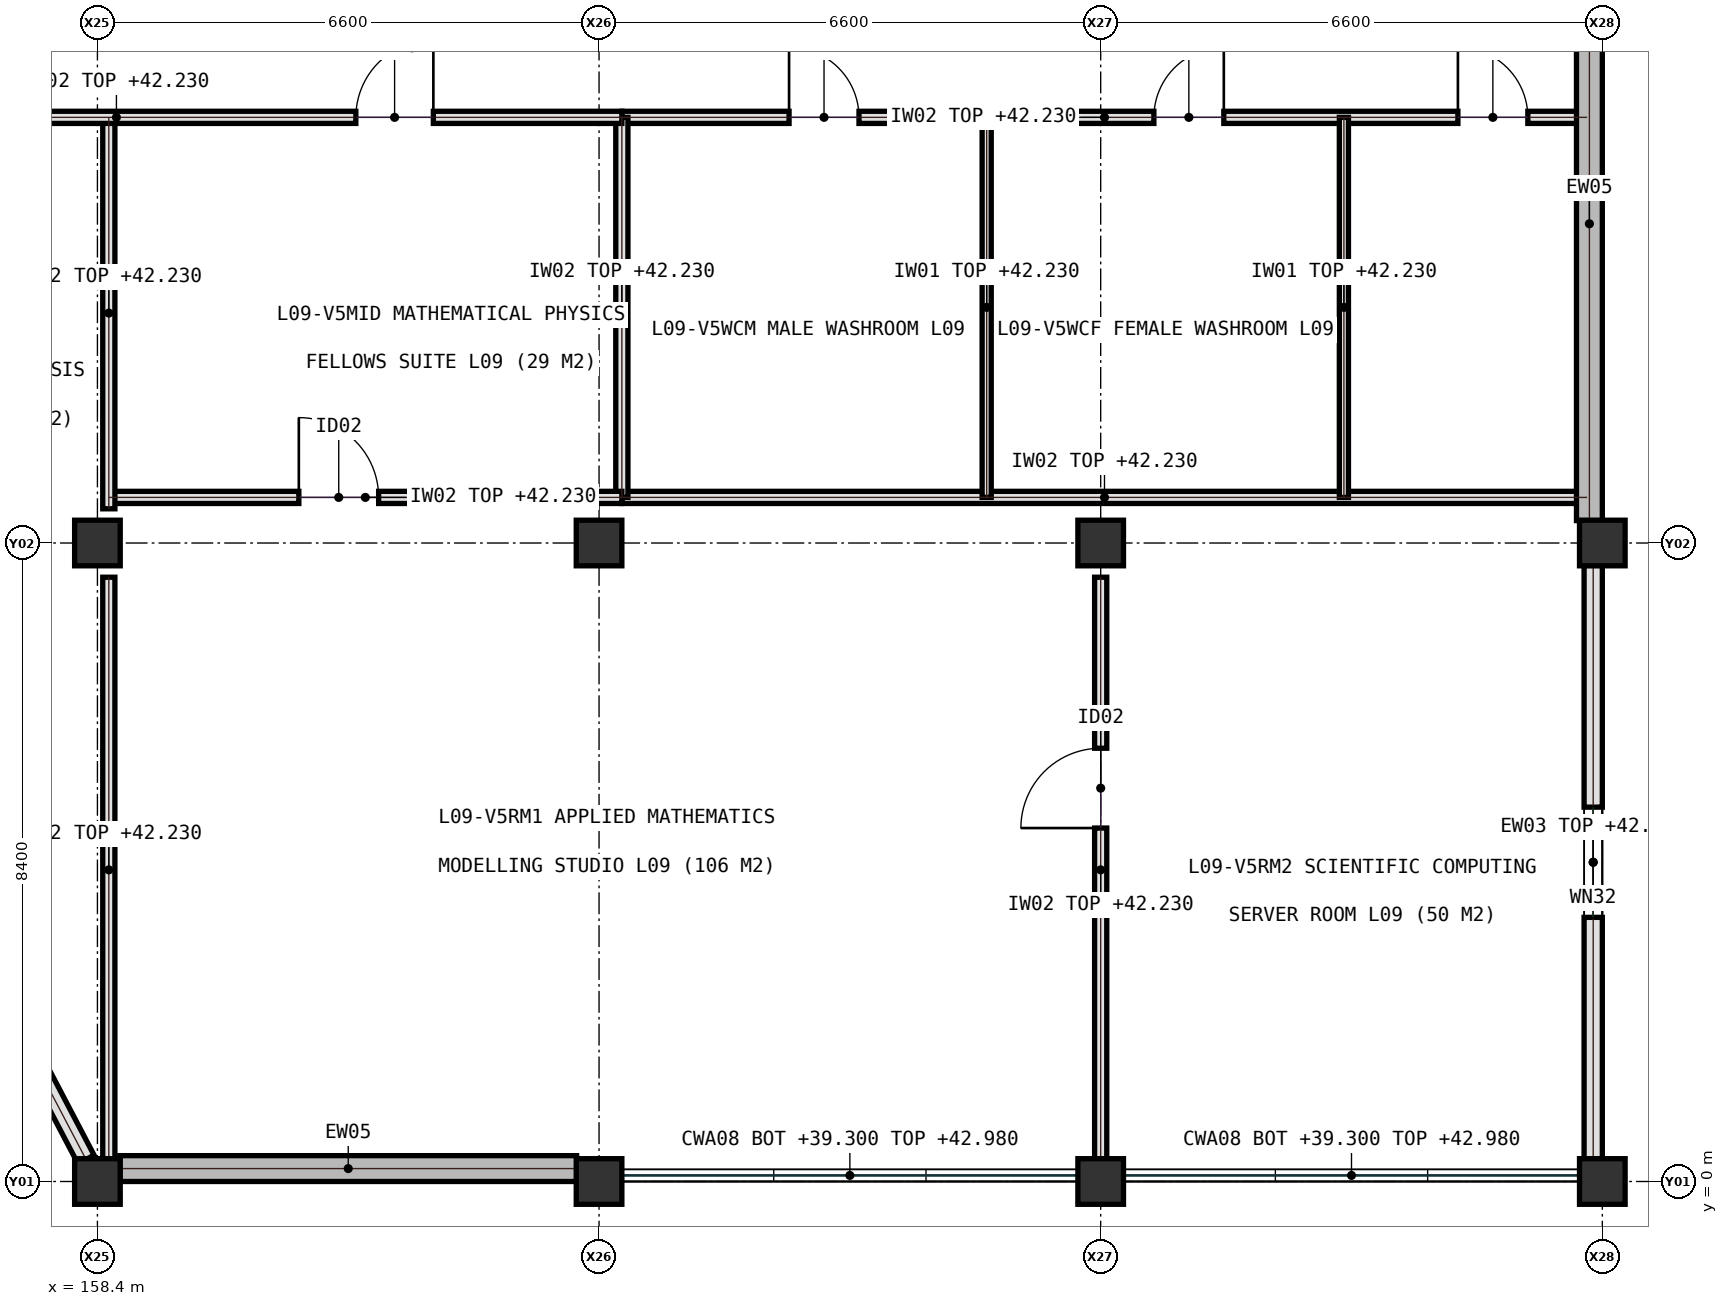
"""IFC4 building model, lengths in metres.
Left out: names, types, materials, properties, quantities, classifications, styles, units other than length and angle.
Written with IfcOpenShell. Run it as: python <this file> out.ifc"""

import sys

from ifc_helpers import new_model, si_unit, direction, frame, frame_2d, origin, origin_2d, place, context, subcontext, project, spatial, rectangle, extrude, element, fill, save


model = new_model("IFC4")
c1 = context("Model", 3, precision=1e-05, world=origin(), true_north=direction((0.0, 1.0)))
c2 = subcontext(c1, "Body", "Model", "MODEL_VIEW")
j1 = project(units=[si_unit("LENGTHUNIT", "METRE"), si_unit("PLANEANGLEUNIT", "RADIAN")], contexts=[c1])
p1 = place(None, origin())
s1 = spatial("IfcSite", under=j1, at=p1, CompositionType="ELEMENT")
p2 = place(p1, origin())
s2 = spatial("IfcBuilding", under=s1, at=p2, CompositionType="ELEMENT")
p3 = place(p2, frame((0.0, 0.0, 39.3)))
s3 = spatial("IfcBuildingStorey", under=s2, at=p3, CompositionType="ELEMENT", Elevation=39.3)
for number, where, z_axis, x_axis in (
    (1, (158.4, 0.0, 0.0), (0.0, 0.0, 1.0), (1.0, 0.0, 0.0)),
    (2, (158.4, 8.4, 0.0), (0.0, 0.0, 1.0), (1.0, 0.0, 0.0)),
    (3, (165.0, 0.0, 0.0), (0.0, 0.0, 1.0), (1.0, 0.0, 0.0)),
    (4, (165.0, 8.4, 0.0), (0.0, 0.0, 1.0), (1.0, 0.0, 0.0)),
    (5, (171.6, 0.0, 0.0), (0.0, 0.0, 1.0), (1.0, 0.0, 0.0)),
    (6, (171.6, 8.4, 0.0), (0.0, 0.0, 1.0), (1.0, 0.0, 0.0)),
    (7, (178.2, 0.0, 0.0), (0.0, 0.0, 1.0), (1.0, 0.0, 0.0)),
    (8, (178.2, 8.4, 0.0), (0.0, 0.0, 1.0), (1.0, 0.0, 0.0)),
):
    element("IfcColumn", number, at=place(p3, frame(where, z_axis=z_axis, x_axis=x_axis)), inside=s3, PredefinedType="COLUMN", context=c2, shape_type="SweptSolid", body=[
        extrude(rectangle(XDim=0.6, YDim=0.6, at=origin_2d()), origin(), (0.0, 0.0, 1.0), 3.9),
    ])
p4 = place(p3, frame((165.3, 14.0, 0.0), z_axis=(0.0, 0.0, 1.0), x_axis=(1.0, 0.0, 0.0)))
e9 = element("IfcWall", 9, at=p4, inside=s3, PredefinedType="PARTITIONING", context=c2, shape_type="SweptSolid", body=[
    extrude(rectangle(XDim=12.7, YDim=0.16, at=frame_2d((6.35, 0.0))), origin(), (0.0, 0.0, 1.0), 2.93),
])
p5 = place(p4, frame((2.2, 0.0, 0.0)))
e10 = element("IfcOpeningElement", 10, at=p5, cuts=e9, PredefinedType="OPENING", context=c2, shape_type="SweptSolid", body=[
    extrude(rectangle(XDim=0.92, YDim=2.08, at=frame_2d((0.46, 1.04))), frame((0.0, 0.09, 0.0), z_axis=(0.0, -1.0, 0.0), x_axis=(1.0, 0.0, 0.0)), (0.0, 0.0, 1.0), 0.18),
])
p6 = place(p4, frame((7.0, 0.0, 0.0)))
e11 = element("IfcOpeningElement", 11, at=p6, cuts=e9, PredefinedType="OPENING", context=c2, shape_type="SweptSolid", body=[
    extrude(rectangle(XDim=0.92, YDim=2.08, at=frame_2d((0.46, 1.04))), frame((0.0, 0.09, 0.0), z_axis=(0.0, -1.0, 0.0), x_axis=(1.0, 0.0, 0.0)), (0.0, 0.0, 1.0), 0.18),
])
p7 = place(p4, frame((11.0, 0.0, 0.0)))
e12 = element("IfcOpeningElement", 12, at=p7, cuts=e9, PredefinedType="OPENING", context=c2, shape_type="SweptSolid", body=[
    extrude(rectangle(XDim=0.92, YDim=2.08, at=frame_2d((0.46, 1.04))), frame((0.0, 0.09, 0.0), z_axis=(0.0, -1.0, 0.0), x_axis=(1.0, 0.0, 0.0)), (0.0, 0.0, 1.0), 0.18),
])
p8 = place(p3, frame((165.3, 9.0, 0.0), z_axis=(0.0, 0.0, 1.0), x_axis=(1.0, 0.0, 0.0)))
e13 = element("IfcWall", 13, at=p8, inside=s3, PredefinedType="PARTITIONING", context=c2, shape_type="SweptSolid", body=[
    extrude(rectangle(XDim=12.7, YDim=0.16, at=frame_2d((6.35, 0.0))), origin(), (0.0, 0.0, 1.0), 2.93),
])
p9 = place(p3, frame((165.3, 9.0, 0.0), z_axis=(0.0, 0.0, 1.0), x_axis=(0.0, 1.0, 0.0)))
e14 = element("IfcWall", 14, at=p9, inside=s3, PredefinedType="PARTITIONING", context=c2, shape_type="SweptSolid", body=[
    extrude(rectangle(XDim=5.0, YDim=0.16, at=frame_2d((2.5, 0.0))), origin(), (0.0, 0.0, 1.0), 2.93),
])
for number, where, z_axis, x_axis in (
    (15, (170.1, 9.0, 0.0), (0.0, 0.0, 1.0), (0.0, 1.0, 0.0)),
    (16, (174.8, 9.0, 0.0), (0.0, 0.0, 1.0), (0.0, 1.0, 0.0)),
):
    element("IfcWall", number, at=place(p3, frame(where, z_axis=z_axis, x_axis=x_axis)), inside=s3, PredefinedType="PARTITIONING", context=c2, shape_type="SweptSolid", body=[
        extrude(rectangle(XDim=5.0, YDim=0.12, at=frame_2d((2.5, 0.0))), origin(), (0.0, 0.0, 1.0), 2.93),
    ])
p10 = place(p3, frame((158.55, 9.0, 0.0), z_axis=(0.0, 0.0, 1.0), x_axis=(1.0, 0.0, 0.0)))
e17 = element("IfcWall", 17, at=p10, inside=s3, PredefinedType="PARTITIONING", context=c2, shape_type="SweptSolid", body=[
    extrude(rectangle(XDim=6.75, YDim=0.16, at=frame_2d((3.375, 0.0))), origin(), (0.0, 0.0, 1.0), 2.93),
])
p11 = place(p10, frame((2.5, 0.0, 0.0)))
e18 = element("IfcOpeningElement", 18, at=p11, cuts=e17, PredefinedType="OPENING", context=c2, shape_type="SweptSolid", body=[
    extrude(rectangle(XDim=1.05, YDim=2.15, at=frame_2d((0.525, 1.075))), frame((0.0, 0.09, 0.0), z_axis=(0.0, -1.0, 0.0), x_axis=(1.0, 0.0, 0.0)), (0.0, 0.0, 1.0), 0.18),
])
p12 = place(p3, frame((171.6, 0.25, 0.0), z_axis=(0.0, 0.0, 1.0), x_axis=(0.0, 1.0, 0.0)))
e19 = element("IfcWall", 19, at=p12, inside=s3, PredefinedType="PARTITIONING", context=c2, shape_type="SweptSolid", body=[
    extrude(rectangle(XDim=7.7, YDim=0.16, at=frame_2d((3.85, 0.0))), origin(), (0.0, 0.0, 1.0), 2.93),
])
p13 = place(p12, frame((4.4, 0.0, 0.0)))
e20 = element("IfcOpeningElement", 20, at=p13, cuts=e19, PredefinedType="OPENING", context=c2, shape_type="SweptSolid", body=[
    extrude(rectangle(XDim=1.05, YDim=2.15, at=frame_2d((0.525, 1.075))), frame((0.0, 0.09, 0.0), z_axis=(0.0, -1.0, 0.0), x_axis=(1.0, 0.0, 0.0)), (0.0, 0.0, 1.0), 0.18),
])
p14 = place(p3, frame((158.55, 0.25, 0.0), z_axis=(0.0, 0.0, 1.0), x_axis=(0.0, 1.0, 0.0)))
e21 = element("IfcWall", 21, at=p14, inside=s3, PredefinedType="PARTITIONING", context=c2, shape_type="SweptSolid", body=[
    extrude(rectangle(XDim=7.7, YDim=0.16, at=frame_2d((3.85, 0.0))), origin(), (0.0, 0.0, 1.0), 2.93),
])
p15 = place(p3, frame((158.55, 8.85, 0.0), z_axis=(0.0, 0.0, 1.0), x_axis=(0.0, 1.0, 0.0)))
e22 = element("IfcWall", 22, at=p15, inside=s3, PredefinedType="PARTITIONING", context=c2, shape_type="SweptSolid", body=[
    extrude(rectangle(XDim=5.15, YDim=0.16, at=frame_2d((2.575, 0.0))), origin(), (0.0, 0.0, 1.0), 2.93),
])
p16 = place(p3, frame((152.0, 14.0, 0.0), z_axis=(0.0, 0.0, 1.0), x_axis=(1.0, 0.0, 0.0)))
e23 = element("IfcWall", 23, at=p16, inside=s3, PredefinedType="PARTITIONING", context=c2, shape_type="SweptSolid", body=[
    extrude(rectangle(XDim=13.3, YDim=0.16, at=frame_2d((6.65, 0.0))), origin(), (0.0, 0.0, 1.0), 2.93),
])
p17 = place(p16, frame((2.6, 0.0, 0.0)))
e24 = element("IfcOpeningElement", 24, at=p17, cuts=e23, PredefinedType="OPENING", context=c2, shape_type="SweptSolid", body=[
    extrude(rectangle(XDim=1.02, YDim=2.18, at=frame_2d((0.51, 1.09))), frame((0.0, 0.09, 0.0), z_axis=(0.0, -1.0, 0.0), x_axis=(1.0, 0.0, 0.0)), (0.0, 0.0, 1.0), 0.18),
])
p18 = place(p16, frame((9.8, 0.0, 0.0)))
e25 = element("IfcOpeningElement", 25, at=p18, cuts=e23, PredefinedType="OPENING", context=c2, shape_type="SweptSolid", body=[
    extrude(rectangle(XDim=1.02, YDim=2.18, at=frame_2d((0.51, 1.09))), frame((0.0, 0.09, 0.0), z_axis=(0.0, -1.0, 0.0), x_axis=(1.0, 0.0, 0.0)), (0.0, 0.0, 1.0), 0.18),
])
p19 = place(p3, frame((158.695, 0.17, 0.0), z_axis=(0.0, 0.0, 1.0), x_axis=(1.0, 0.0, 0.0)))
e26 = element("IfcWall", 26, at=p19, inside=s3, PredefinedType="SHEAR", context=c2, shape_type="SweptSolid", body=[
    extrude(rectangle(XDim=6.01, YDim=0.34, at=frame_2d((3.005, 0.0))), origin(), (0.0, 0.0, 1.0), 3.68),
])
p20 = place(p3, frame((178.08, 0.295, 0.0), z_axis=(0.0, 0.0, 1.0), x_axis=(0.0, 1.0, 0.0)))
e27 = element("IfcWall", 27, at=p20, inside=s3, PredefinedType="SOLIDWALL", context=c2, shape_type="SweptSolid", body=[
    extrude(rectangle(XDim=7.81, YDim=0.24, at=frame_2d((3.905, 0.0))), origin(), (0.0, 0.0, 1.0), 2.965),
])
p21 = place(p20, frame((3.18, 0.0, 0.95)))
e28 = element("IfcOpeningElement", 28, at=p21, cuts=e27, PredefinedType="OPENING", context=c2, shape_type="SweptSolid", body=[
    extrude(rectangle(XDim=1.45, YDim=1.6, at=frame_2d((0.725, 0.8))), frame((0.0, 0.13, 0.0), z_axis=(0.0, -1.0, 0.0), x_axis=(1.0, 0.0, 0.0)), (0.0, 0.0, 1.0), 0.26),
])
p22 = place(p3, frame((178.03, 8.695, 0.0), z_axis=(0.0, 0.0, 1.0), x_axis=(0.0, 1.0, 0.0)))
e29 = element("IfcWall", 29, at=p22, inside=s3, PredefinedType="SHEAR", context=c2, shape_type="SweptSolid", body=[
    extrude(rectangle(XDim=7.81, YDim=0.34, at=frame_2d((3.905, 0.0))), origin(), (0.0, 0.0, 1.0), 3.68),
])
p23 = place(p3, frame((155.25, 6.01, 0.0), z_axis=(0.0, 0.0, 1.0), x_axis=(0.464471613901, -0.885588007981, 0.0)))
e30 = element("IfcWall", 30, at=p23, inside=s3, PredefinedType="SOLIDWALL", context=c2, shape_type="SweptSolid", body=[
    extrude(rectangle(XDim=6.459, YDim=0.24, at=frame_2d((3.229, 0.0))), origin(), (0.0, 0.0, 1.0), 3.105),
])
p24 = place(p23, frame((2.03, 0.0, 0.95)))
e31 = element("IfcOpeningElement", 31, at=p24, cuts=e30, PredefinedType="OPENING", context=c2, shape_type="SweptSolid", body=[
    extrude(rectangle(XDim=2.4, YDim=1.6, at=frame_2d((1.2, 0.8))), frame((0.0, 0.13, 0.0), z_axis=(0.0, -1.0, 0.0), x_axis=(1.0, 0.0, 0.0)), (0.0, 0.0, 1.0), 0.26),
])
p25 = place(p5, origin())
e32 = element("IfcDoor", 32, at=p25, inside=s3, OperationType="SINGLE_SWING_LEFT", PredefinedType="DOOR", context=c2, shape_type="SweptSolid", body=[
    extrude(rectangle(XDim=0.92, YDim=2.08, at=frame_2d((0.46, 1.04))), frame((0.0, 0.025, 0.0), z_axis=(0.0, -1.0, 0.0), x_axis=(1.0, 0.0, 0.0)), (0.0, 0.0, 1.0), 0.05),
])
fill(e10, e32)
p26 = place(p6, origin())
e33 = element("IfcDoor", 33, at=p26, inside=s3, OperationType="SINGLE_SWING_RIGHT", PredefinedType="DOOR", context=c2, shape_type="SweptSolid", body=[
    extrude(rectangle(XDim=0.92, YDim=2.08, at=frame_2d((0.46, 1.04))), frame((0.0, 0.025, 0.0), z_axis=(0.0, -1.0, 0.0), x_axis=(1.0, 0.0, 0.0)), (0.0, 0.0, 1.0), 0.05),
])
fill(e11, e33)
p27 = place(p7, origin())
e34 = element("IfcDoor", 34, at=p27, inside=s3, OperationType="SINGLE_SWING_LEFT", PredefinedType="DOOR", context=c2, shape_type="SweptSolid", body=[
    extrude(rectangle(XDim=0.92, YDim=2.08, at=frame_2d((0.46, 1.04))), frame((0.0, 0.025, 0.0), z_axis=(0.0, -1.0, 0.0), x_axis=(1.0, 0.0, 0.0)), (0.0, 0.0, 1.0), 0.05),
])
fill(e12, e34)
p28 = place(p11, origin())
e35 = element("IfcDoor", 35, at=p28, inside=s3, OperationType="SINGLE_SWING_LEFT", PredefinedType="DOOR", context=c2, shape_type="SweptSolid", body=[
    extrude(rectangle(XDim=1.05, YDim=2.15, at=frame_2d((0.525, 1.075))), frame((0.0, 0.025, 0.0), z_axis=(0.0, -1.0, 0.0), x_axis=(1.0, 0.0, 0.0)), (0.0, 0.0, 1.0), 0.05),
])
fill(e18, e35)
p29 = place(p13, origin())
e36 = element("IfcDoor", 36, at=p29, inside=s3, OperationType="SINGLE_SWING_LEFT", PredefinedType="DOOR", context=c2, shape_type="SweptSolid", body=[
    extrude(rectangle(XDim=1.05, YDim=2.15, at=frame_2d((0.525, 1.075))), frame((0.0, 0.025, 0.0), z_axis=(0.0, -1.0, 0.0), x_axis=(1.0, 0.0, 0.0)), (0.0, 0.0, 1.0), 0.05),
])
fill(e20, e36)
p30 = place(p18, origin())
e37 = element("IfcDoor", 37, at=p30, inside=s3, OperationType="SINGLE_SWING_RIGHT", PredefinedType="DOOR", context=c2, shape_type="SweptSolid", body=[
    extrude(rectangle(XDim=1.02, YDim=2.18, at=frame_2d((0.51, 1.09))), frame((0.0, 0.025, 0.0), z_axis=(0.0, -1.0, 0.0), x_axis=(1.0, 0.0, 0.0)), (0.0, 0.0, 1.0), 0.05),
])
fill(e25, e37)
p31 = place(p21, origin())
e38 = element("IfcWindow", 38, at=p31, inside=s3, PartitioningType="SINGLE_PANEL", PredefinedType="WINDOW", context=c2, shape_type="SweptSolid", body=[
    extrude(rectangle(XDim=1.45, YDim=1.6, at=frame_2d((0.725, 0.8))), frame((0.0, 0.03, 0.0), z_axis=(0.0, -1.0, 0.0), x_axis=(1.0, 0.0, 0.0)), (0.0, 0.0, 1.0), 0.06),
])
fill(e28, e38)
save(model, sys.argv[1])
